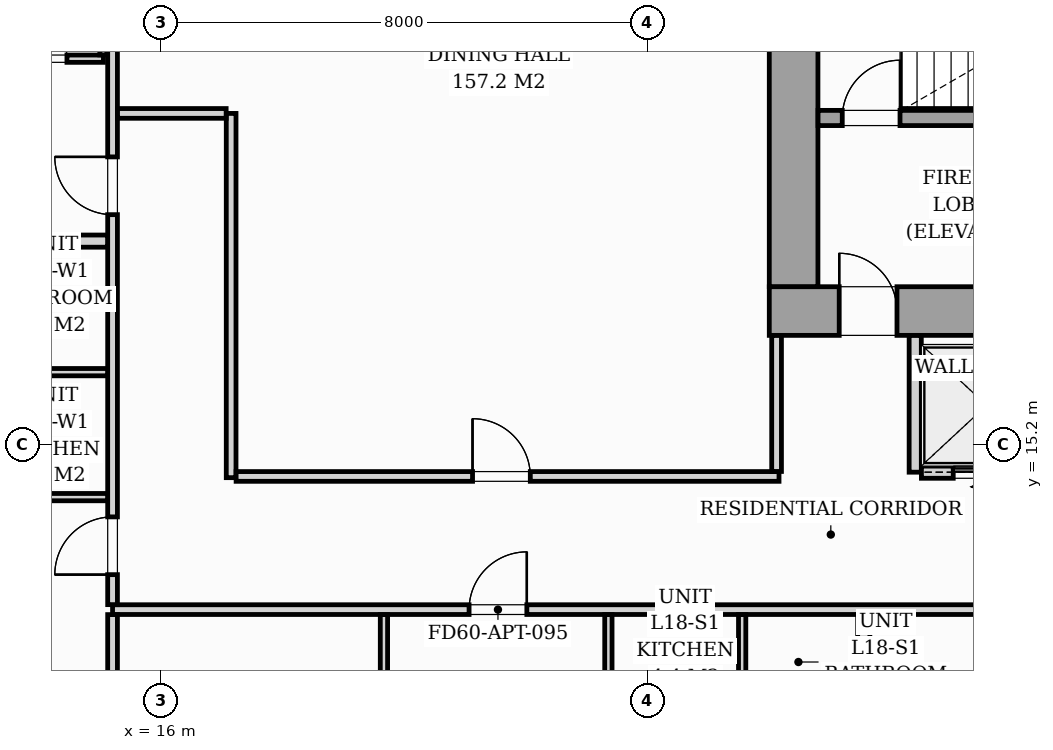
"""IFC4 building model, lengths in metres.
Left out: names, types, materials, properties, quantities, classifications, styles, units other than length and angle.
Written with IfcOpenShell. Run it as: python <this file> out.ifc"""

import sys

from ifc_helpers import new_model, si_unit, direction, frame, frame_2d, origin, origin_2d, place, context, subcontext, project, spatial, rectangle, i_section, extrude, source, transform, mapped, element, fill, save


model = new_model("IFC4")
c1 = context("Model", 3, precision=1e-05, world=origin(), true_north=direction((0.0, 1.0)))
c2 = subcontext(c1, "Body", "Model", "MODEL_VIEW")
j1 = project(units=[si_unit("LENGTHUNIT", "METRE"), si_unit("PLANEANGLEUNIT", "RADIAN")], contexts=[c1])
p1 = place(None, origin())
s1 = spatial("IfcSite", under=j1, at=p1, CompositionType="ELEMENT")
p2 = place(p1, origin())
s2 = spatial("IfcBuilding", under=s1, at=p2, CompositionType="ELEMENT")
p3 = place(p2, frame((0.0, 0.0, 64.6)))
s3 = spatial("IfcBuildingStorey", under=s2, at=p3, CompositionType="ELEMENT", Elevation=64.6)
m1 = source(origin(), c2, "Body", "SweptSolid", [
    extrude(i_section(OverallWidth=0.437, OverallDepth=0.514, WebThickness=0.061, FlangeThickness=0.097, FilletRadius=0.018, at=origin_2d()), origin(), (0.0, 0.0, 1.0), 3.196),
])
p4 = place(p3, frame((26.4, 17.4, 0.002), z_axis=(0.0, 0.0, 1.0), x_axis=(1.0, 0.0, 0.0)))
e1 = element("IfcColumn", 1, at=p4, inside=s3, PredefinedType="PILASTER", context=c2, shape_type="MappedRepresentation", body=[
    mapped(m1, transform((0.0, 0.0, 0.0), scale=1.0)),
])
p5 = place(p3, frame((26.0, 17.4, 0.0), z_axis=(0.0, 0.0, 1.0), x_axis=(1.0, 0.0, 0.0)))
e2 = element("IfcWall", 2, at=p5, inside=s3, PredefinedType="SHEAR", context=c2, shape_type="SweptSolid", body=[
    extrude(rectangle(XDim=20.0, YDim=0.8, at=frame_2d((10.0, 0.0))), origin(), (0.0, 0.0, 1.0), 3.2),
])
p6 = place(p5, frame((1.15, 0.0, 0.0)))
e3 = element("IfcOpeningElement", 3, at=p6, cuts=e2, PredefinedType="OPENING", context=c2, shape_type="SweptSolid", body=[
    extrude(rectangle(XDim=0.95, YDim=2.06, at=frame_2d((0.475, 1.03))), frame((0.0, 0.41, 0.0), z_axis=(0.0, -1.0, 0.0), x_axis=(1.0, 0.0, 0.0)), (0.0, 0.0, 1.0), 0.82),
])
p7 = place(p5, frame((9.58, 0.0, 0.0)))
e4 = element("IfcOpeningElement", 4, at=p7, cuts=e2, PredefinedType="OPENING", context=c2, shape_type="SweptSolid", body=[
    extrude(rectangle(XDim=0.85, YDim=2.0, at=frame_2d((0.425, 1.0))), frame((0.0, 0.41, 0.0), z_axis=(0.0, -1.0, 0.0), x_axis=(1.0, 0.0, 0.0)), (0.0, 0.0, 1.0), 0.82),
])
p8 = place(p5, frame((17.75, 0.0, 0.0)))
e5 = element("IfcOpeningElement", 5, at=p8, cuts=e2, PredefinedType="OPENING", context=c2, shape_type="SweptSolid", body=[
    extrude(rectangle(XDim=0.95, YDim=2.06, at=frame_2d((0.475, 1.03))), frame((0.0, 0.41, 0.0), z_axis=(0.0, -1.0, 0.0), x_axis=(1.0, 0.0, 0.0)), (0.0, 0.0, 1.0), 0.82),
])
p9 = place(p3, frame((26.4, 17.802, 0.0), z_axis=(0.0, 0.0, 1.0), x_axis=(0.0, 1.0, 0.0)))
e6 = element("IfcWall", 6, at=p9, inside=s3, PredefinedType="SHEAR", context=c2, shape_type="SweptSolid", body=[
    extrude(rectangle(XDim=5.796, YDim=0.8, at=frame_2d((2.898, 0.0))), origin(), (0.0, 0.0, 1.0), 3.2),
])
p10 = place(p3, frame((26.802, 20.575, 0.0), z_axis=(0.0, 0.0, 1.0), x_axis=(1.0, 0.0, 0.0)))
e7 = element("IfcWall", 7, at=p10, inside=s3, PredefinedType="SOLIDWALL", context=c2, shape_type="SweptSolid", body=[
    extrude(rectangle(XDim=8.148, YDim=0.25, at=frame_2d((4.074, 0.0))), origin(), (0.0, 0.0, 1.0), 3.2),
])
p11 = place(p10, frame((0.398, 0.0, 0.0)))
e8 = element("IfcOpeningElement", 8, at=p11, cuts=e7, PredefinedType="OPENING", context=c2, shape_type="SweptSolid", body=[
    extrude(rectangle(XDim=0.95, YDim=2.06, at=frame_2d((0.475, 1.03))), frame((0.0, 0.135, 0.0), z_axis=(0.0, -1.0, 0.0), x_axis=(1.0, 0.0, 0.0)), (0.0, 0.0, 1.0), 0.27),
])
p12 = place(p3, frame((28.4, 14.75, 0.0), z_axis=(0.0, 0.0, 1.0), x_axis=(0.0, 1.0, 0.0)))
e9 = element("IfcWall", 9, at=p12, inside=s3, PredefinedType="PARTITIONING", context=c2, shape_type="SweptSolid", body=[
    extrude(rectangle(XDim=2.248, YDim=0.2, at=frame_2d((1.124, 0.0))), origin(), (0.0, 0.0, 1.0), 2.9),
])
p13 = place(p3, frame((28.502, 14.75, 0.0), z_axis=(0.0, 0.0, 1.0), x_axis=(1.0, 0.0, 0.0)))
e10 = element("IfcWall", 10, at=p13, inside=s3, PredefinedType="PARTITIONING", context=c2, shape_type="SweptSolid", body=[
    extrude(rectangle(XDim=2.146, YDim=0.2, at=frame_2d((1.073, 0.0))), origin(), (0.0, 0.0, 1.0), 2.9),
])
p14 = place(p13, frame((0.523, 0.0, 0.0)))
e11 = element("IfcOpeningElement", 11, at=p14, cuts=e10, PredefinedType="OPENING", context=c2, shape_type="SweptSolid", body=[
    extrude(rectangle(XDim=1.05, YDim=2.08, at=frame_2d((0.525, 1.04))), frame((0.0, 0.11, 0.0), z_axis=(0.0, -1.0, 0.0), x_axis=(1.0, 0.0, 0.0)), (0.0, 0.0, 1.0), 0.22),
])
p15 = place(p3, frame((15.2, 12.49, 0.0), z_axis=(0.0, 0.0, 1.0), x_axis=(1.0, 0.0, 0.0)))
e12 = element("IfcWall", 12, at=p15, inside=s3, PredefinedType="PARTITIONING", context=c2, shape_type="SweptSolid", body=[
    extrude(rectangle(XDim=37.1, YDim=0.16, at=frame_2d((18.55, 0.0))), origin(), (0.0, 0.0, 1.0), 2.9),
])
p16 = place(p15, frame((5.863, 0.0, 0.0)))
e13 = element("IfcOpeningElement", 13, at=p16, cuts=e12, PredefinedType="OPENING", context=c2, shape_type="SweptSolid", body=[
    extrude(rectangle(XDim=0.95, YDim=2.06, at=frame_2d((0.475, 1.03))), frame((0.0, 0.09, 0.0), z_axis=(0.0, -1.0, 0.0), x_axis=(1.0, 0.0, 0.0)), (0.0, 0.0, 1.0), 0.18),
])
p17 = place(p15, frame((18.25, 0.0, 0.0)))
e14 = element("IfcOpeningElement", 14, at=p17, cuts=e12, PredefinedType="OPENING", context=c2, shape_type="SweptSolid", body=[
    extrude(rectangle(XDim=0.95, YDim=2.06, at=frame_2d((0.475, 1.03))), frame((0.0, 0.09, 0.0), z_axis=(0.0, -1.0, 0.0), x_axis=(1.0, 0.0, 0.0)), (0.0, 0.0, 1.0), 0.18),
])
p18 = place(p15, frame((30.63, 0.0, 0.0)))
e15 = element("IfcOpeningElement", 15, at=p18, cuts=e12, PredefinedType="OPENING", context=c2, shape_type="SweptSolid", body=[
    extrude(rectangle(XDim=0.95, YDim=2.06, at=frame_2d((0.475, 1.03))), frame((0.0, 0.09, 0.0), z_axis=(0.0, -1.0, 0.0), x_axis=(1.0, 0.0, 0.0)), (0.0, 0.0, 1.0), 0.18),
])
p19 = place(p3, frame((15.2, 2.962, 0.0), z_axis=(0.0, 0.0, 1.0), x_axis=(0.0, 1.0, 0.0)))
e16 = element("IfcWall", 16, at=p19, inside=s3, PredefinedType="PARTITIONING", context=c2, shape_type="SweptSolid", body=[
    extrude(rectangle(XDim=9.446, YDim=0.16, at=frame_2d((4.723, 0.0))), origin(), (0.0, 0.0, 1.0), 2.9),
])
p20 = place(p3, frame((15.2, 12.572, 0.0), z_axis=(0.0, 0.0, 1.0), x_axis=(0.0, 1.0, 0.0)))
e17 = element("IfcWall", 17, at=p20, inside=s3, PredefinedType="PARTITIONING", context=c2, shape_type="SweptSolid", body=[
    extrude(rectangle(XDim=14.866, YDim=0.16, at=frame_2d((7.433, 0.0))), origin(), (0.0, 0.0, 1.0), 2.9),
])
p21 = place(p20, frame((0.493, 0.0, 0.0)))
e18 = element("IfcOpeningElement", 18, at=p21, cuts=e17, PredefinedType="OPENING", context=c2, shape_type="SweptSolid", body=[
    extrude(rectangle(XDim=0.95, YDim=2.06, at=frame_2d((0.475, 1.03))), frame((0.0, 0.09, 0.0), z_axis=(0.0, -1.0, 0.0), x_axis=(1.0, 0.0, 0.0)), (0.0, 0.0, 1.0), 0.18),
])
p22 = place(p20, frame((6.413, 0.0, 0.0)))
e19 = element("IfcOpeningElement", 19, at=p22, cuts=e17, PredefinedType="OPENING", context=c2, shape_type="SweptSolid", body=[
    extrude(rectangle(XDim=0.95, YDim=2.06, at=frame_2d((0.475, 1.03))), frame((0.0, 0.09, 0.0), z_axis=(0.0, -1.0, 0.0), x_axis=(1.0, 0.0, 0.0)), (0.0, 0.0, 1.0), 0.18),
])
for number, where, z_axis, x_axis in (
    (20, (23.354, 10.302, 0.0), (0.0, 0.0, 1.0), (0.0, 1.0, 0.0)),
    (21, (25.554, 10.302, 0.0), (0.0, 0.0, 1.0), (0.0, 1.0, 0.0)),
):
    element("IfcWall", number, at=place(p3, frame(where, z_axis=z_axis, x_axis=x_axis)), inside=s3, PredefinedType="PARTITIONING", context=c2, shape_type="SweptSolid", body=[
        extrude(rectangle(XDim=2.106, YDim=0.12, at=frame_2d((1.053, 0.0))), origin(), (0.0, 0.0, 1.0), 2.9),
    ])
p23 = place(p3, frame((19.663, 2.962, 0.0), z_axis=(0.0, 0.0, 1.0), x_axis=(0.0, 1.0, 0.0)))
e22 = element("IfcWall", 22, at=p23, inside=s3, PredefinedType="PARTITIONING", context=c2, shape_type="SweptSolid", body=[
    extrude(rectangle(XDim=9.446, YDim=0.12, at=frame_2d((4.723, 0.0))), origin(), (0.0, 0.0, 1.0), 2.9),
])
p24 = place(p23, frame((4.288, 0.0, 0.0)))
e23 = element("IfcOpeningElement", 23, at=p24, cuts=e22, PredefinedType="OPENING", context=c2, shape_type="SweptSolid", body=[
    extrude(rectangle(XDim=0.85, YDim=2.05, at=frame_2d((0.425, 1.025))), frame((0.0, 0.07, 0.0), z_axis=(0.0, -1.0, 0.0), x_axis=(1.0, 0.0, 0.0)), (0.0, 0.0, 1.0), 0.14),
])
p25 = place(p3, frame((27.554, 10.302, 0.0), z_axis=(0.0, 0.0, 1.0), x_axis=(0.0, 1.0, 0.0)))
e24 = element("IfcWall", 24, at=p25, inside=s3, PredefinedType="PARTITIONING", context=c2, shape_type="SweptSolid", body=[
    extrude(rectangle(XDim=2.106, YDim=0.2, at=frame_2d((1.053, 0.0))), origin(), (0.0, 0.0, 1.0), 2.9),
])
p26 = place(p3, frame((5.88, 18.55, 0.0), z_axis=(0.0, 0.0, 1.0), x_axis=(1.0, 0.0, 0.0)))
e25 = element("IfcWall", 25, at=p26, inside=s3, PredefinedType="PARTITIONING", context=c2, shape_type="SweptSolid", body=[
    extrude(rectangle(XDim=9.238, YDim=0.2, at=frame_2d((4.619, 0.0))), origin(), (0.0, 0.0, 1.0), 2.9),
])
for number, where, z_axis, x_axis in (
    (26, (12.862, 16.395, 0.0), (0.0, 0.0, 1.0), (1.0, 0.0, 0.0)),
    (27, (12.862, 14.34, 0.0), (0.0, 0.0, 1.0), (1.0, 0.0, 0.0)),
):
    element("IfcWall", number, at=place(p3, frame(where, z_axis=z_axis, x_axis=x_axis)), inside=s3, PredefinedType="PARTITIONING", context=c2, shape_type="SweptSolid", body=[
        extrude(rectangle(XDim=2.256, YDim=0.12, at=frame_2d((1.128, 0.0))), origin(), (0.0, 0.0, 1.0), 2.9),
    ])
p27 = place(p3, frame((10.85, 21.55, 0.0), z_axis=(0.0, 0.0, 1.0), x_axis=(1.0, 0.0, 0.0)))
e28 = element("IfcWall", 28, at=p27, inside=s3, PredefinedType="PARTITIONING", context=c2, shape_type="SweptSolid", body=[
    extrude(rectangle(XDim=4.2, YDim=0.12, at=frame_2d((2.1, 0.0))), origin(), (0.0, 0.0, 1.0), 2.9),
])
p28 = place(p27, frame((0.675, 0.0, 0.0)))
e29 = element("IfcOpeningElement", 29, at=p28, cuts=e28, PredefinedType="OPENING", context=c2, shape_type="SweptSolid", body=[
    extrude(rectangle(XDim=0.8, YDim=2.0, at=frame_2d((0.4, 1.0))), frame((0.0, 0.07, 0.0), z_axis=(0.0, -1.0, 0.0), x_axis=(1.0, 0.0, 0.0)), (0.0, 0.0, 1.0), 0.14),
])
p29 = place(p27, frame((2.8, 0.0, 0.0)))
e30 = element("IfcOpeningElement", 30, at=p29, cuts=e28, PredefinedType="OPENING", context=c2, shape_type="SweptSolid", body=[
    extrude(rectangle(XDim=0.8, YDim=2.02, at=frame_2d((0.4, 1.01))), frame((0.0, 0.07, 0.0), z_axis=(0.0, -1.0, 0.0), x_axis=(1.0, 0.0, 0.0)), (0.0, 0.0, 1.0), 0.14),
])
p30 = place(p3, frame((15.05, 21.612, 0.0), z_axis=(0.0, 0.0, 1.0), x_axis=(0.0, 1.0, 0.0)))
e31 = element("IfcWall", 31, at=p30, inside=s3, PredefinedType="PARTITIONING", context=c2, shape_type="SweptSolid", body=[
    extrude(rectangle(XDim=2.126, YDim=0.12, at=frame_2d((1.063, 0.0))), origin(), (0.0, 0.0, 1.0), 2.9),
])
p31 = place(p3, frame((17.15, 14.66, 0.0), z_axis=(0.0, 0.0, 1.0), x_axis=(0.0, 1.0, 0.0)))
e32 = element("IfcWall", 32, at=p31, inside=s3, PredefinedType="PARTITIONING", context=c2, shape_type="SweptSolid", body=[
    extrude(rectangle(XDim=5.99, YDim=0.16, at=frame_2d((2.995, 0.0))), origin(), (0.0, 0.0, 1.0), 2.9),
])
p32 = place(p3, frame((15.282, 20.65, 0.0), z_axis=(0.0, 0.0, 1.0), x_axis=(1.0, 0.0, 0.0)))
e33 = element("IfcWall", 33, at=p32, inside=s3, PredefinedType="PARTITIONING", context=c2, shape_type="SweptSolid", body=[
    extrude(rectangle(XDim=1.786, YDim=0.16, at=frame_2d((0.893, 0.0))), origin(), (0.0, 0.0, 1.0), 2.9),
])
p33 = place(p3, frame((17.232, 14.68, 0.0), z_axis=(0.0, 0.0, 1.0), x_axis=(1.0, 0.0, 0.0)))
e34 = element("IfcWall", 34, at=p33, inside=s3, PredefinedType="PARTITIONING", context=c2, shape_type="SweptSolid", body=[
    extrude(rectangle(XDim=8.928, YDim=0.16, at=frame_2d((4.464, 0.0))), origin(), (0.0, 0.0, 1.0), 2.9),
])
p34 = place(p33, frame((3.888, 0.0, 0.0)))
e35 = element("IfcOpeningElement", 35, at=p34, cuts=e34, PredefinedType="OPENING", context=c2, shape_type="SweptSolid", body=[
    extrude(rectangle(XDim=0.95, YDim=2.06, at=frame_2d((0.475, 1.03))), frame((0.0, 0.09, 0.0), z_axis=(0.0, -1.0, 0.0), x_axis=(1.0, 0.0, 0.0)), (0.0, 0.0, 1.0), 0.18),
])
p35 = place(p3, frame((26.12, 14.762, 0.0), z_axis=(0.0, 0.0, 1.0), x_axis=(0.0, 1.0, 0.0)))
e36 = element("IfcWall", 36, at=p35, inside=s3, PredefinedType="PARTITIONING", context=c2, shape_type="SweptSolid", body=[
    extrude(rectangle(XDim=2.236, YDim=0.16, at=frame_2d((1.118, 0.0))), origin(), (0.0, 0.0, 1.0), 2.9),
])
m2 = source(origin(), c2, "Body", "SweptSolid", [
    extrude(rectangle(XDim=0.95, YDim=2.06, at=frame_2d((0.475, 1.03))), frame((0.0, 0.025, 0.0), z_axis=(0.0, -1.0, 0.0), x_axis=(1.0, 0.0, 0.0)), (0.0, 0.0, 1.0), 0.05),
])
p36 = place(p6, origin())
e37 = element("IfcDoor", 37, at=p36, inside=s3, OperationType="SINGLE_SWING_LEFT", PredefinedType="DOOR", context=c2, shape_type="MappedRepresentation", body=[
    mapped(m2, transform((0.0, 0.0, 0.0), scale=1.0)),
])
fill(e3, e37)
p37 = place(p11, origin())
e38 = element("IfcDoor", 38, at=p37, inside=s3, OperationType="SINGLE_SWING_RIGHT", PredefinedType="DOOR", context=c2, shape_type="MappedRepresentation", body=[
    mapped(m2, transform((0.0, 0.0, 0.0), scale=1.0)),
])
fill(e8, e38)
m3 = source(origin(), c2, "Body", "SweptSolid", [
    extrude(rectangle(XDim=1.05, YDim=2.08, at=frame_2d((0.525, 1.04))), frame((0.0, 0.025, 0.0), z_axis=(0.0, -1.0, 0.0), x_axis=(1.0, 0.0, 0.0)), (0.0, 0.0, 1.0), 0.05),
])
p38 = place(p14, origin())
e39 = element("IfcDoor", 39, at=p38, inside=s3, OperationType="SLIDING_TO_LEFT", PredefinedType="DOOR", context=c2, shape_type="MappedRepresentation", body=[
    mapped(m3, transform((0.0, 0.0, 0.0), scale=1.0)),
])
fill(e11, e39)
m4 = source(origin(), c2, "Body", "SweptSolid", [
    extrude(rectangle(XDim=0.95, YDim=2.06, at=frame_2d((0.475, 1.03))), frame((0.0, 0.025, 0.0), z_axis=(0.0, -1.0, 0.0), x_axis=(1.0, 0.0, 0.0)), (0.0, 0.0, 1.0), 0.05),
])
p39 = place(p16, origin())
e40 = element("IfcDoor", 40, at=p39, inside=s3, OperationType="SINGLE_SWING_RIGHT", PredefinedType="DOOR", context=c2, shape_type="MappedRepresentation", body=[
    mapped(m4, transform((0.0, 0.0, 0.0), scale=1.0)),
])
fill(e13, e40)
p40 = place(p21, origin())
e41 = element("IfcDoor", 41, at=p40, inside=s3, OperationType="SINGLE_SWING_LEFT", PredefinedType="DOOR", context=c2, shape_type="MappedRepresentation", body=[
    mapped(m4, transform((0.0, 0.0, 0.0), scale=1.0)),
])
fill(e18, e41)
p41 = place(p22, origin())
e42 = element("IfcDoor", 42, at=p41, inside=s3, OperationType="SINGLE_SWING_RIGHT", PredefinedType="DOOR", context=c2, shape_type="MappedRepresentation", body=[
    mapped(m4, transform((0.0, 0.0, 0.0), scale=1.0)),
])
fill(e19, e42)
m5 = source(origin(), c2, "Body", "SweptSolid", [
    extrude(rectangle(XDim=0.8, YDim=2.02, at=frame_2d((0.4, 1.01))), frame((0.0, 0.025, 0.0), z_axis=(0.0, -1.0, 0.0), x_axis=(1.0, 0.0, 0.0)), (0.0, 0.0, 1.0), 0.05),
])
p42 = place(p29, origin())
e43 = element("IfcDoor", 43, at=p42, inside=s3, OperationType="SINGLE_SWING_LEFT", PredefinedType="DOOR", context=c2, shape_type="MappedRepresentation", body=[
    mapped(m5, transform((0.0, 0.0, 0.0), scale=1.0)),
])
fill(e30, e43)
p43 = place(p34, origin())
e44 = element("IfcDoor", 44, at=p43, inside=s3, OperationType="SINGLE_SWING_LEFT", PredefinedType="DOOR", context=c2, shape_type="MappedRepresentation", body=[
    mapped(m4, transform((0.0, 0.0, 0.0), scale=1.0)),
])
fill(e35, e44)
save(model, sys.argv[1])
